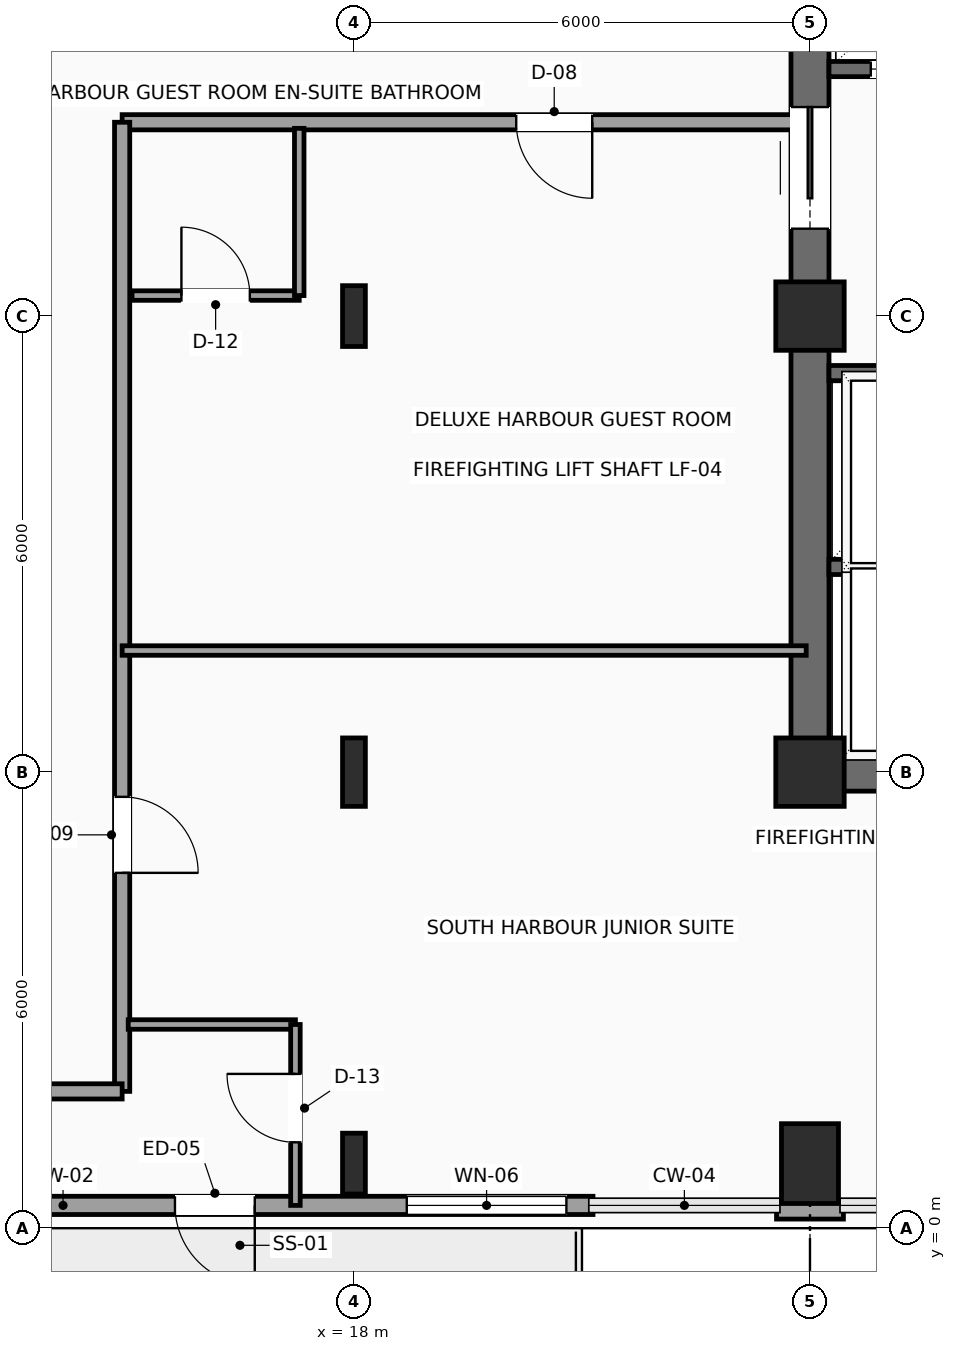
"""IFC4 building model, lengths in metres.
Left out: names, types, materials, properties, quantities, classifications, styles, units other than length and angle.
Written with IfcOpenShell. Run it as: python <this file> out.ifc"""

import sys

from ifc_helpers import new_model, si_unit, direction, frame, frame_2d, origin, origin_2d, place, context, subcontext, project, spatial, rectangle, i_section, extrude, element, fill, save


model = new_model("IFC4")
c1 = context("Model", 3, precision=1e-05, world=origin(), true_north=direction((0.0, 1.0)))
c2 = subcontext(c1, "Body", "Model", "MODEL_VIEW")
j1 = project(units=[si_unit("LENGTHUNIT", "METRE"), si_unit("PLANEANGLEUNIT", "RADIAN")], contexts=[c1])
p1 = place(None, origin())
s1 = spatial("IfcSite", under=j1, at=p1, CompositionType="ELEMENT")
p2 = place(p1, origin())
s2 = spatial("IfcBuilding", under=s1, at=p2, CompositionType="ELEMENT")
p3 = place(p2, frame((0.0, 0.0, 208.65)))
s3 = spatial("IfcBuildingStorey", under=s2, at=p3, CompositionType="ELEMENT", Elevation=208.65)
for number, where, z_axis, x_axis in (
    (1, (24.0, 6.0, 0.0), (0.0, 0.0, 1.0), (1.0, 0.0, 0.0)),
    (2, (24.0, 12.0, 0.0), (0.0, 0.0, 1.0), (1.0, 0.0, 0.0)),
):
    element("IfcColumn", number, at=place(p3, frame(where, z_axis=z_axis, x_axis=x_axis)), inside=s3, PredefinedType="COLUMN", context=c2, shape_type="SweptSolid", body=[
        extrude(rectangle(XDim=0.9, YDim=0.9, at=origin_2d()), origin(), (0.0, 0.0, 1.0), 3.75),
    ])
p4 = place(p3, frame((18.0, 0.85, 0.0), z_axis=(0.0, 0.0, 1.0), x_axis=(1.0, 0.0, 0.0)))
e3 = element("IfcColumn", 3, at=p4, inside=s3, PredefinedType="COLUMN", context=c2, shape_type="SweptSolid", body=[
    extrude(i_section(OverallWidth=0.3, OverallDepth=0.8, WebThickness=0.018, FlangeThickness=0.033, FilletRadius=0.03, at=origin_2d()), origin(), (0.0, 0.0, 1.0), 3.75),
])
p5 = place(p3, frame((18.0, 6.0, 0.0), z_axis=(0.0, 0.0, 1.0), x_axis=(1.0, 0.0, 0.0)))
e4 = element("IfcColumn", 4, at=p5, inside=s3, PredefinedType="COLUMN", context=c2, shape_type="SweptSolid", body=[
    extrude(i_section(OverallWidth=0.3, OverallDepth=0.9, WebThickness=0.019, FlangeThickness=0.035, FilletRadius=0.03, at=origin_2d()), origin(), (0.0, 0.0, 1.0), 3.75),
])
p6 = place(p3, frame((18.0, 12.0, 0.0), z_axis=(0.0, 0.0, 1.0), x_axis=(1.0, 0.0, 0.0)))
e5 = element("IfcColumn", 5, at=p6, inside=s3, PredefinedType="COLUMN", context=c2, shape_type="SweptSolid", body=[
    extrude(i_section(OverallWidth=0.3, OverallDepth=0.8, WebThickness=0.018, FlangeThickness=0.033, FilletRadius=0.03, at=origin_2d()), origin(), (0.0, 0.0, 1.0), 3.75),
])
p7 = place(p3, frame((24.0, 0.85, 0.0), z_axis=(0.0, 0.0, 1.0), x_axis=(1.0, 0.0, 0.0)))
e6 = element("IfcColumn", 6, at=p7, inside=s3, PredefinedType="COLUMN", context=c2, shape_type="SweptSolid", body=[
    extrude(rectangle(XDim=0.75, YDim=1.05, at=origin_2d()), origin(), (0.0, 0.0, 1.0), 3.75),
])
p8 = place(p3, frame((21.145, 0.3, 0.0), z_axis=(0.0, 0.0, 1.0), x_axis=(-1.0, 0.0, 0.0)))
e7 = element("IfcWall", 7, at=p8, inside=s3, PredefinedType="SOLIDWALL", context=c2, shape_type="SweptSolid", body=[
    extrude(rectangle(XDim=9.29, YDim=0.24, at=frame_2d((4.645, 0.0))), origin(), (0.0, 0.0, 1.0), 3.54),
])
p9 = place(p8, frame((4.45, 0.0, 0.0)))
e8 = element("IfcOpeningElement", 8, at=p9, cuts=e7, PredefinedType="OPENING", context=c2, shape_type="SweptSolid", body=[
    extrude(rectangle(XDim=1.05, YDim=2.2, at=frame_2d((0.525, 1.1))), frame((0.0, 0.13, 0.0), z_axis=(0.0, -1.0, 0.0), x_axis=(1.0, 0.0, 0.0)), (0.0, 0.0, 1.0), 0.26),
])
p10 = place(p8, frame((0.35, 0.0, 0.85)))
e9 = element("IfcOpeningElement", 9, at=p10, cuts=e7, PredefinedType="OPENING", context=c2, shape_type="SweptSolid", body=[
    extrude(rectangle(XDim=2.1, YDim=2.2, at=frame_2d((1.05, 1.1))), frame((0.0, 0.13, 0.0), z_axis=(0.0, -1.0, 0.0), x_axis=(1.0, 0.0, 0.0)), (0.0, 0.0, 1.0), 0.26),
])
p11 = place(p3, frame((24.44, 0.24, 0.0), z_axis=(0.0, 0.0, 1.0), x_axis=(-1.0, 0.0, 0.0)))
e10 = element("IfcWall", 10, at=p11, inside=s3, PredefinedType="SOLIDWALL", context=c2, shape_type="SweptSolid", body=[
    extrude(rectangle(XDim=0.88, YDim=0.24, at=frame_2d((0.44, 0.0))), origin(), (0.0, 0.0, 1.0), 3.54),
])
p12 = place(p3, frame((24.0, 6.0, 0.0), z_axis=(0.0, 0.0, 1.0), x_axis=(1.0, 0.0, 0.0)))
e11 = element("IfcWall", 11, at=p12, inside=s3, PredefinedType="SHEAR", context=c2, shape_type="SweptSolid", body=[
    extrude(rectangle(XDim=9.6, YDim=0.5, at=frame_2d((4.8, 0.0))), origin(), (0.0, 0.0, 1.0), 3.54),
])
p13 = place(p3, frame((24.0, 6.0, 0.0), z_axis=(0.0, 0.0, 1.0), x_axis=(0.0, 1.0, 0.0)))
e12 = element("IfcWall", 12, at=p13, inside=s3, PredefinedType="SHEAR", context=c2, shape_type="SweptSolid", body=[
    extrude(rectangle(XDim=12.0, YDim=0.5, at=frame_2d((6.0, 0.0))), origin(), (0.0, 0.0, 1.0), 3.54),
])
p14 = place(p13, frame((7.15, 0.0, 0.0)))
e13 = element("IfcOpeningElement", 13, at=p14, cuts=e12, PredefinedType="OPENING", context=c2, shape_type="SweptSolid", body=[
    extrude(rectangle(XDim=1.6, YDim=2.3, at=frame_2d((0.8, 1.15))), frame((0.0, 0.26, 0.0), z_axis=(0.0, -1.0, 0.0), x_axis=(1.0, 0.0, 0.0)), (0.0, 0.0, 1.0), 0.52),
])
for number, where, z_axis, x_axis in (
    (14, (24.25, 8.7, 0.0), (0.0, 0.0, 1.0), (1.0, 0.0, 0.0)),
    (15, (24.25, 11.25, 0.0), (0.0, 0.0, 1.0), (1.0, 0.0, 0.0)),
):
    element("IfcWall", number, at=place(p3, frame(where, z_axis=z_axis, x_axis=x_axis)), inside=s3, PredefinedType="SHEAR", context=c2, shape_type="SweptSolid", body=[
        extrude(rectangle(XDim=2.17, YDim=0.2, at=frame_2d((1.085, 0.0))), origin(), (0.0, 0.0, 1.0), 3.54),
    ])
p15 = place(p3, frame((24.25, 15.25, 0.0), z_axis=(0.0, 0.0, 1.0), x_axis=(1.0, 0.0, 0.0)))
e16 = element("IfcWall", 16, at=p15, inside=s3, PredefinedType="SHEAR", context=c2, shape_type="SweptSolid", body=[
    extrude(rectangle(XDim=5.2, YDim=0.2, at=frame_2d((2.6, 0.0))), origin(), (0.0, 0.0, 1.0), 3.54),
])
p16 = place(p15, frame((0.55, 0.0, 0.0)))
e17 = element("IfcOpeningElement", 17, at=p16, cuts=e16, PredefinedType="OPENING", context=c2, shape_type="SweptSolid", body=[
    extrude(rectangle(XDim=1.2, YDim=2.2, at=frame_2d((0.6, 1.1))), frame((0.0, 0.11, 0.0), z_axis=(0.0, -1.0, 0.0), x_axis=(1.0, 0.0, 0.0)), (0.0, 0.0, 1.0), 0.22),
])
p17 = place(p15, frame((3.15, 0.0, 0.0)))
e18 = element("IfcOpeningElement", 18, at=p17, cuts=e16, PredefinedType="OPENING", context=c2, shape_type="SweptSolid", body=[
    extrude(rectangle(XDim=1.2, YDim=2.2, at=frame_2d((0.6, 1.1))), frame((0.0, 0.11, 0.0), z_axis=(0.0, -1.0, 0.0), x_axis=(1.0, 0.0, 0.0)), (0.0, 0.0, 1.0), 0.22),
])
p18 = place(p3, frame((23.95, 14.55, 0.0), z_axis=(0.0, 0.0, 1.0), x_axis=(-1.0, 0.0, 0.0)))
e19 = element("IfcWall", 19, at=p18, inside=s3, PredefinedType="PARTITIONING", context=c2, shape_type="SweptSolid", body=[
    extrude(rectangle(XDim=9.0, YDim=0.2, at=frame_2d((4.5, 0.0))), origin(), (0.0, 0.0, 1.0), 3.54),
])
p19 = place(p18, frame((2.815, 0.0, 0.0)))
e20 = element("IfcOpeningElement", 20, at=p19, cuts=e19, PredefinedType="OPENING", context=c2, shape_type="SweptSolid", body=[
    extrude(rectangle(XDim=1.0, YDim=2.2, at=frame_2d((0.5, 1.1))), frame((0.0, 0.11, 0.0), z_axis=(0.0, -1.0, 0.0), x_axis=(1.0, 0.0, 0.0)), (0.0, 0.0, 1.0), 0.22),
])
p20 = place(p3, frame((14.95, 14.55, 0.0), z_axis=(0.0, 0.0, 1.0), x_axis=(0.0, -1.0, 0.0)))
e21 = element("IfcWall", 21, at=p20, inside=s3, PredefinedType="PARTITIONING", context=c2, shape_type="SweptSolid", body=[
    extrude(rectangle(XDim=12.75, YDim=0.2, at=frame_2d((6.375, 0.0))), origin(), (0.0, 0.0, 1.0), 3.54),
])
p21 = place(p20, frame((8.875, 0.0, 0.0)))
e22 = element("IfcOpeningElement", 22, at=p21, cuts=e21, PredefinedType="OPENING", context=c2, shape_type="SweptSolid", body=[
    extrude(rectangle(XDim=1.0, YDim=2.2, at=frame_2d((0.5, 1.1))), frame((0.0, 0.11, 0.0), z_axis=(0.0, -1.0, 0.0), x_axis=(1.0, 0.0, 0.0)), (0.0, 0.0, 1.0), 0.22),
])
p22 = place(p3, frame((14.95, 1.8, 0.0), z_axis=(0.0, 0.0, 1.0), x_axis=(-1.0, 0.0, 0.0)))
e23 = element("IfcWall", 23, at=p22, inside=s3, PredefinedType="PARTITIONING", context=c2, shape_type="SweptSolid", body=[
    extrude(rectangle(XDim=2.35, YDim=0.2, at=frame_2d((1.175, 0.0))), origin(), (0.0, 0.0, 1.0), 3.54),
])
p23 = place(p3, frame((14.95, 7.6, 0.0), z_axis=(0.0, 0.0, 1.0), x_axis=(1.0, 0.0, 0.0)))
e24 = element("IfcWall", 24, at=p23, inside=s3, PredefinedType="PARTITIONING", context=c2, shape_type="SweptSolid", body=[
    extrude(rectangle(XDim=9.0, YDim=0.125, at=frame_2d((4.5, 0.0))), origin(), (0.0, 0.0, 1.0), 3.54),
])
p24 = place(p3, frame((15.03, 2.68, 0.0), z_axis=(0.0, 0.0, 1.0), x_axis=(1.0, 0.0, 0.0)))
e25 = element("IfcWall", 25, at=p24, inside=s3, PredefinedType="PARTITIONING", context=c2, shape_type="SweptSolid", body=[
    extrude(rectangle(XDim=2.2, YDim=0.125, at=frame_2d((1.1, 0.0))), origin(), (0.0, 0.0, 1.0), 3.54),
])
p25 = place(p3, frame((17.23, 0.3, 0.0), z_axis=(0.0, 0.0, 1.0), x_axis=(0.0, 1.0, 0.0)))
e26 = element("IfcWall", 26, at=p25, inside=s3, PredefinedType="PARTITIONING", context=c2, shape_type="SweptSolid", body=[
    extrude(rectangle(XDim=2.38, YDim=0.125, at=frame_2d((1.19, 0.0))), origin(), (0.0, 0.0, 1.0), 3.54),
])
p26 = place(p25, frame((0.83, 0.0, 0.0)))
e27 = element("IfcOpeningElement", 27, at=p26, cuts=e26, PredefinedType="OPENING", context=c2, shape_type="SweptSolid", body=[
    extrude(rectangle(XDim=0.9, YDim=2.1, at=frame_2d((0.45, 1.05))), frame((0.0, 0.073, 0.0), z_axis=(0.0, -1.0, 0.0), x_axis=(1.0, 0.0, 0.0)), (0.0, 0.0, 1.0), 0.145),
])
p27 = place(p3, frame((15.08, 12.27, 0.0), z_axis=(0.0, 0.0, 1.0), x_axis=(1.0, 0.0, 0.0)))
e28 = element("IfcWall", 28, at=p27, inside=s3, PredefinedType="PARTITIONING", context=c2, shape_type="SweptSolid", body=[
    extrude(rectangle(XDim=2.2, YDim=0.125, at=frame_2d((1.1, 0.0))), origin(), (0.0, 0.0, 1.0), 3.132),
])
p28 = place(p27, frame((0.65, 0.0, 0.0)))
e29 = element("IfcOpeningElement", 29, at=p28, cuts=e28, PredefinedType="OPENING", context=c2, shape_type="SweptSolid", body=[
    extrude(rectangle(XDim=0.9, YDim=2.1, at=frame_2d((0.45, 1.05))), frame((0.0, 0.073, 0.0), z_axis=(0.0, -1.0, 0.0), x_axis=(1.0, 0.0, 0.0)), (0.0, 0.0, 1.0), 0.145),
])
p29 = place(p3, frame((17.28, 12.27, 0.0), z_axis=(0.0, 0.0, 1.0), x_axis=(0.0, 1.0, 0.0)))
e30 = element("IfcWall", 30, at=p29, inside=s3, PredefinedType="PARTITIONING", context=c2, shape_type="SweptSolid", body=[
    extrude(rectangle(XDim=2.2, YDim=0.125, at=frame_2d((1.1, 0.0))), origin(), (0.0, 0.0, 1.0), 3.54),
])
p30 = place(p9, origin())
e31 = element("IfcDoor", 31, at=p30, inside=s3, OperationType="SINGLE_SWING_LEFT", PredefinedType="DOOR", context=c2, shape_type="SweptSolid", body=[
    extrude(rectangle(XDim=1.05, YDim=2.2, at=frame_2d((0.525, 1.1))), frame((0.0, 0.025, 0.0), z_axis=(0.0, -1.0, 0.0), x_axis=(1.0, 0.0, 0.0)), (0.0, 0.0, 1.0), 0.05),
])
fill(e8, e31)
p31 = place(p10, origin())
e32 = element("IfcWindow", 32, at=p31, inside=s3, PartitioningType="SINGLE_PANEL", PredefinedType="WINDOW", context=c2, shape_type="SweptSolid", body=[
    extrude(rectangle(XDim=2.1, YDim=2.2, at=frame_2d((1.05, 1.1))), frame((0.0, 0.03, 0.0), z_axis=(0.0, -1.0, 0.0), x_axis=(1.0, 0.0, 0.0)), (0.0, 0.0, 1.0), 0.06),
])
fill(e9, e32)
p32 = place(p14, origin())
e33 = element("IfcDoor", 33, at=p32, inside=s3, OperationType="DOUBLE_DOOR_SLIDING", PredefinedType="DOOR", context=c2, shape_type="SweptSolid", body=[
    extrude(rectangle(XDim=1.6, YDim=2.3, at=frame_2d((0.8, 1.15))), frame((0.0, 0.025, 0.0), z_axis=(0.0, -1.0, 0.0), x_axis=(1.0, 0.0, 0.0)), (0.0, 0.0, 1.0), 0.05),
])
fill(e13, e33)
p33 = place(p16, origin())
e34 = element("IfcDoor", 34, at=p33, inside=s3, OperationType="SLIDING_TO_RIGHT", PredefinedType="DOOR", context=c2, shape_type="SweptSolid", body=[
    extrude(rectangle(XDim=1.2, YDim=2.2, at=frame_2d((0.6, 1.1))), frame((0.0, 0.025, 0.0), z_axis=(0.0, -1.0, 0.0), x_axis=(1.0, 0.0, 0.0)), (0.0, 0.0, 1.0), 0.05),
])
fill(e17, e34)
p34 = place(p19, origin())
e35 = element("IfcDoor", 35, at=p34, inside=s3, OperationType="SINGLE_SWING_LEFT", PredefinedType="DOOR", context=c2, shape_type="SweptSolid", body=[
    extrude(rectangle(XDim=1.0, YDim=2.2, at=frame_2d((0.5, 1.1))), frame((0.0, 0.025, 0.0), z_axis=(0.0, -1.0, 0.0), x_axis=(1.0, 0.0, 0.0)), (0.0, 0.0, 1.0), 0.05),
])
fill(e20, e35)
p35 = place(p21, origin())
e36 = element("IfcDoor", 36, at=p35, inside=s3, OperationType="SINGLE_SWING_RIGHT", PredefinedType="DOOR", context=c2, shape_type="SweptSolid", body=[
    extrude(rectangle(XDim=1.0, YDim=2.2, at=frame_2d((0.5, 1.1))), frame((0.0, 0.025, 0.0), z_axis=(0.0, -1.0, 0.0), x_axis=(1.0, 0.0, 0.0)), (0.0, 0.0, 1.0), 0.05),
])
fill(e22, e36)
p36 = place(p26, origin())
e37 = element("IfcDoor", 37, at=p36, inside=s3, OperationType="SINGLE_SWING_RIGHT", PredefinedType="DOOR", context=c2, shape_type="SweptSolid", body=[
    extrude(rectangle(XDim=0.9, YDim=2.1, at=frame_2d((0.45, 1.05))), frame((0.0, 0.025, 0.0), z_axis=(0.0, -1.0, 0.0), x_axis=(1.0, 0.0, 0.0)), (0.0, 0.0, 1.0), 0.05),
])
fill(e27, e37)
p37 = place(p28, origin())
e38 = element("IfcDoor", 38, at=p37, inside=s3, OperationType="SINGLE_SWING_LEFT", PredefinedType="DOOR", context=c2, shape_type="SweptSolid", body=[
    extrude(rectangle(XDim=0.9, YDim=2.1, at=frame_2d((0.45, 1.05))), frame((0.0, 0.025, 0.0), z_axis=(0.0, -1.0, 0.0), x_axis=(1.0, 0.0, 0.0)), (0.0, 0.0, 1.0), 0.05),
])
fill(e29, e38)
save(model, sys.argv[1])
